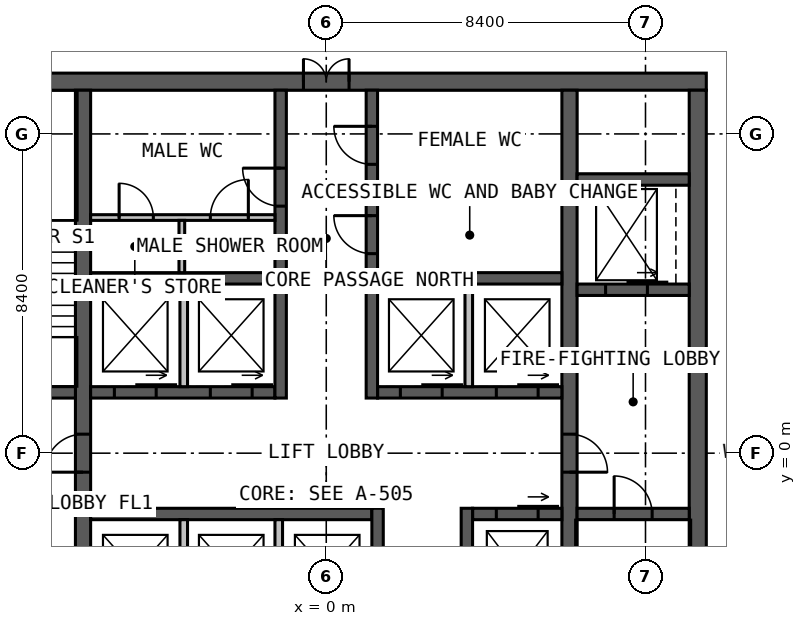
"""IFC4 building model, lengths in metres.
Left out: names, types, materials, properties, quantities, classifications, styles, units other than length and angle.
Written with IfcOpenShell. Run it as: python <this file> out.ifc"""

import sys

from ifc_helpers import new_model, si_unit, direction, frame, frame_2d, origin, place, context, subcontext, project, spatial, rectangle, extrude, element, fill, save


model = new_model("IFC4")
c1 = context("Model", 3, precision=1e-05, world=origin(), true_north=direction((0.0, 1.0)))
c2 = subcontext(c1, "Body", "Model", "MODEL_VIEW")
j1 = project(units=[si_unit("LENGTHUNIT", "METRE"), si_unit("PLANEANGLEUNIT", "RADIAN")], contexts=[c1])
p1 = place(None, origin())
s1 = spatial("IfcSite", under=j1, at=p1, CompositionType="ELEMENT")
p2 = place(p1, origin())
s2 = spatial("IfcBuilding", under=s1, at=p2, CompositionType="ELEMENT")
p3 = place(p2, frame((0.0, 0.0, 183.0)))
s3 = spatial("IfcBuildingStorey", under=s2, at=p3, CompositionType="ELEMENT", Elevation=183.0)
p4 = place(p3, frame((-10.0, 9.775, 0.0), z_axis=(0.0, 0.0, 1.0), x_axis=(1.0, 0.0, 0.0)))
e1 = element("IfcWall", 1, at=p4, inside=s3, PredefinedType="SOLIDWALL", context=c2, shape_type="SweptSolid", body=[
    extrude(rectangle(XDim=20.0, YDim=0.45, at=frame_2d((10.0, 0.0))), origin(), (0.0, 0.0, 1.0), 4.0),
])
p5 = place(p4, frame((9.4, 0.0, 0.0)))
e2 = element("IfcOpeningElement", 2, at=p5, cuts=e1, PredefinedType="OPENING", context=c2, shape_type="SweptSolid", body=[
    extrude(rectangle(XDim=1.2, YDim=2.2, at=frame_2d((0.6, 1.1))), frame((0.0, 0.235, 0.0), z_axis=(0.0, -1.0, 0.0), x_axis=(1.0, 0.0, 0.0)), (0.0, 0.0, 1.0), 0.47),
])
p6 = place(p3, frame((9.775, -9.55, 0.0), z_axis=(0.0, 0.0, 1.0), x_axis=(0.0, 1.0, 0.0)))
e3 = element("IfcWall", 3, at=p6, inside=s3, PredefinedType="SOLIDWALL", context=c2, shape_type="SweptSolid", body=[
    extrude(rectangle(XDim=19.1, YDim=0.45, at=frame_2d((9.55, 0.0))), origin(), (0.0, 0.0, 1.0), 4.0),
])
p7 = place(p3, frame((-6.4, -9.55, 0.0), z_axis=(0.0, 0.0, 1.0), x_axis=(0.0, 1.0, 0.0)))
e4 = element("IfcWall", 4, at=p7, inside=s3, PredefinedType="SOLIDWALL", context=c2, shape_type="SweptSolid", body=[
    extrude(rectangle(XDim=19.1, YDim=0.4, at=frame_2d((9.55, 0.0))), origin(), (0.0, 0.0, 1.0), 4.0),
])
p8 = place(p7, frame((9.05, 0.0, 0.0)))
e5 = element("IfcOpeningElement", 5, at=p8, cuts=e4, PredefinedType="OPENING", context=c2, shape_type="SweptSolid", body=[
    extrude(rectangle(XDim=1.0, YDim=2.2, at=frame_2d((0.5, 1.1))), frame((0.0, 0.21, 0.0), z_axis=(0.0, -1.0, 0.0), x_axis=(1.0, 0.0, 0.0)), (0.0, 0.0, 1.0), 0.42),
])
p9 = place(p3, frame((6.4, 9.55, 0.0), z_axis=(0.0, 0.0, 1.0), x_axis=(0.0, -1.0, 0.0)))
e6 = element("IfcWall", 6, at=p9, inside=s3, PredefinedType="SOLIDWALL", context=c2, shape_type="SweptSolid", body=[
    extrude(rectangle(XDim=19.1, YDim=0.4, at=frame_2d((9.55, 0.0))), origin(), (0.0, 0.0, 1.0), 4.0),
])
p10 = place(p9, frame((9.05, 0.0, 0.0)))
e7 = element("IfcOpeningElement", 7, at=p10, cuts=e6, PredefinedType="OPENING", context=c2, shape_type="SweptSolid", body=[
    extrude(rectangle(XDim=1.0, YDim=2.2, at=frame_2d((0.5, 1.1))), frame((0.0, 0.21, 0.0), z_axis=(0.0, -1.0, 0.0), x_axis=(1.0, 0.0, 0.0)), (0.0, 0.0, 1.0), 0.42),
])
p11 = place(p3, frame((-6.2, 1.6, 0.0), z_axis=(0.0, 0.0, 1.0), x_axis=(1.0, 0.0, 0.0)))
e8 = element("IfcWall", 8, at=p11, inside=s3, PredefinedType="SOLIDWALL", context=c2, shape_type="SweptSolid", body=[
    extrude(rectangle(XDim=4.85, YDim=0.3, at=frame_2d((2.425, 0.0))), origin(), (0.0, 0.0, 1.0), 4.0),
])
p12 = place(p11, frame((0.625, 0.0, 0.0)))
e9 = element("IfcOpeningElement", 9, at=p12, cuts=e8, PredefinedType="OPENING", context=c2, shape_type="SweptSolid", body=[
    extrude(rectangle(XDim=1.1, YDim=2.2, at=frame_2d((0.55, 1.1))), frame((0.0, 0.16, 0.0), z_axis=(0.0, -1.0, 0.0), x_axis=(1.0, 0.0, 0.0)), (0.0, 0.0, 1.0), 0.32),
])
p13 = place(p11, frame((3.15, 0.0, 0.0)))
e10 = element("IfcOpeningElement", 10, at=p13, cuts=e8, PredefinedType="OPENING", context=c2, shape_type="SweptSolid", body=[
    extrude(rectangle(XDim=1.1, YDim=2.2, at=frame_2d((0.55, 1.1))), frame((0.0, 0.16, 0.0), z_axis=(0.0, -1.0, 0.0), x_axis=(1.0, 0.0, 0.0)), (0.0, 0.0, 1.0), 0.32),
])
p14 = place(p3, frame((1.35, 1.6, 0.0), z_axis=(0.0, 0.0, 1.0), x_axis=(1.0, 0.0, 0.0)))
e11 = element("IfcWall", 11, at=p14, inside=s3, PredefinedType="SOLIDWALL", context=c2, shape_type="SweptSolid", body=[
    extrude(rectangle(XDim=4.85, YDim=0.3, at=frame_2d((2.425, 0.0))), origin(), (0.0, 0.0, 1.0), 4.0),
])
p15 = place(p14, frame((0.6, 0.0, 0.0)))
e12 = element("IfcOpeningElement", 12, at=p15, cuts=e11, PredefinedType="OPENING", context=c2, shape_type="SweptSolid", body=[
    extrude(rectangle(XDim=1.1, YDim=2.2, at=frame_2d((0.55, 1.1))), frame((0.0, 0.16, 0.0), z_axis=(0.0, -1.0, 0.0), x_axis=(1.0, 0.0, 0.0)), (0.0, 0.0, 1.0), 0.32),
])
p16 = place(p14, frame((3.125, 0.0, 0.0)))
e13 = element("IfcOpeningElement", 13, at=p16, cuts=e11, PredefinedType="OPENING", context=c2, shape_type="SweptSolid", body=[
    extrude(rectangle(XDim=1.1, YDim=2.2, at=frame_2d((0.55, 1.1))), frame((0.0, 0.16, 0.0), z_axis=(0.0, -1.0, 0.0), x_axis=(1.0, 0.0, 0.0)), (0.0, 0.0, 1.0), 0.32),
])
for number, where, z_axis, x_axis in (
    (14, (-6.2, 4.6, 0.0), (0.0, 0.0, 1.0), (1.0, 0.0, 0.0)),
    (15, (1.35, 4.6, 0.0), (0.0, 0.0, 1.0), (1.0, 0.0, 0.0)),
):
    element("IfcWall", number, at=place(p3, frame(where, z_axis=z_axis, x_axis=x_axis)), inside=s3, PredefinedType="SOLIDWALL", context=c2, shape_type="SweptSolid", body=[
        extrude(rectangle(XDim=4.85, YDim=0.3, at=frame_2d((2.425, 0.0))), origin(), (0.0, 0.0, 1.0), 4.0),
    ])
p17 = place(p3, frame((-1.2, 1.45, 0.0), z_axis=(0.0, 0.0, 1.0), x_axis=(0.0, 1.0, 0.0)))
e16 = element("IfcWall", 16, at=p17, inside=s3, PredefinedType="SOLIDWALL", context=c2, shape_type="SweptSolid", body=[
    extrude(rectangle(XDim=8.1, YDim=0.3, at=frame_2d((4.05, 0.0))), origin(), (0.0, 0.0, 1.0), 4.0),
])
p18 = place(p17, frame((5.05, 0.0, 0.0)))
e17 = element("IfcOpeningElement", 17, at=p18, cuts=e16, PredefinedType="OPENING", context=c2, shape_type="SweptSolid", body=[
    extrude(rectangle(XDim=1.0, YDim=2.2, at=frame_2d((0.5, 1.1))), frame((0.0, 0.16, 0.0), z_axis=(0.0, -1.0, 0.0), x_axis=(1.0, 0.0, 0.0)), (0.0, 0.0, 1.0), 0.32),
])
p19 = place(p3, frame((1.2, 1.45, 0.0), z_axis=(0.0, 0.0, 1.0), x_axis=(0.0, 1.0, 0.0)))
e18 = element("IfcWall", 18, at=p19, inside=s3, PredefinedType="SOLIDWALL", context=c2, shape_type="SweptSolid", body=[
    extrude(rectangle(XDim=8.1, YDim=0.3, at=frame_2d((4.05, 0.0))), origin(), (0.0, 0.0, 1.0), 4.0),
])
p20 = place(p19, frame((3.8, 0.0, 0.0)))
e19 = element("IfcOpeningElement", 19, at=p20, cuts=e18, PredefinedType="OPENING", context=c2, shape_type="SweptSolid", body=[
    extrude(rectangle(XDim=1.0, YDim=2.2, at=frame_2d((0.5, 1.1))), frame((0.0, 0.16, 0.0), z_axis=(0.0, -1.0, 0.0), x_axis=(1.0, 0.0, 0.0)), (0.0, 0.0, 1.0), 0.32),
])
p21 = place(p19, frame((6.15, 0.0, 0.0)))
e20 = element("IfcOpeningElement", 20, at=p21, cuts=e18, PredefinedType="OPENING", context=c2, shape_type="SweptSolid", body=[
    extrude(rectangle(XDim=1.0, YDim=2.2, at=frame_2d((0.5, 1.1))), frame((0.0, 0.16, 0.0), z_axis=(0.0, -1.0, 0.0), x_axis=(1.0, 0.0, 0.0)), (0.0, 0.0, 1.0), 0.32),
])
p22 = place(p3, frame((-6.2, -1.6, 0.0), z_axis=(0.0, 0.0, 1.0), x_axis=(1.0, 0.0, 0.0)))
e21 = element("IfcWall", 21, at=p22, inside=s3, PredefinedType="SOLIDWALL", context=c2, shape_type="SweptSolid", body=[
    extrude(rectangle(XDim=7.4, YDim=0.3, at=frame_2d((3.7, 0.0))), origin(), (0.0, 0.0, 1.0), 4.0),
])
p23 = place(p3, frame((3.85, -1.6, 0.0), z_axis=(0.0, 0.0, 1.0), x_axis=(1.0, 0.0, 0.0)))
e22 = element("IfcWall", 22, at=p23, inside=s3, PredefinedType="SOLIDWALL", context=c2, shape_type="SweptSolid", body=[
    extrude(rectangle(XDim=2.35, YDim=0.3, at=frame_2d((1.175, 0.0))), origin(), (0.0, 0.0, 1.0), 4.0),
])
p24 = place(p23, frame((0.625, 0.0, 0.0)))
e23 = element("IfcOpeningElement", 23, at=p24, cuts=e22, PredefinedType="OPENING", context=c2, shape_type="SweptSolid", body=[
    extrude(rectangle(XDim=1.1, YDim=2.2, at=frame_2d((0.55, 1.1))), frame((0.0, 0.16, 0.0), z_axis=(0.0, -1.0, 0.0), x_axis=(1.0, 0.0, 0.0)), (0.0, 0.0, 1.0), 0.32),
])
p25 = place(p3, frame((1.35, -1.45, 0.0), z_axis=(0.0, 0.0, 1.0), x_axis=(0.0, -1.0, 0.0)))
e24 = element("IfcWall", 24, at=p25, inside=s3, PredefinedType="SOLIDWALL", context=c2, shape_type="SweptSolid", body=[
    extrude(rectangle(XDim=8.1, YDim=0.3, at=frame_2d((4.05, 0.0))), origin(), (0.0, 0.0, 1.0), 4.0),
])
p26 = place(p25, frame((5.975, 0.0, 0.0)))
e25 = element("IfcOpeningElement", 25, at=p26, cuts=e24, PredefinedType="OPENING", context=c2, shape_type="SweptSolid", body=[
    extrude(rectangle(XDim=1.0, YDim=2.2, at=frame_2d((0.5, 1.1))), frame((0.0, 0.16, 0.0), z_axis=(0.0, -1.0, 0.0), x_axis=(1.0, 0.0, 0.0)), (0.0, 0.0, 1.0), 0.32),
])
p27 = place(p25, frame((3.525, 0.0, 0.0)))
e26 = element("IfcOpeningElement", 26, at=p27, cuts=e24, PredefinedType="OPENING", context=c2, shape_type="SweptSolid", body=[
    extrude(rectangle(XDim=0.9, YDim=2.2, at=frame_2d((0.45, 1.1))), frame((0.0, 0.16, 0.0), z_axis=(0.0, -1.0, 0.0), x_axis=(1.0, 0.0, 0.0)), (0.0, 0.0, 1.0), 0.32),
])
p28 = place(p3, frame((3.7, -1.45, 0.0), z_axis=(0.0, 0.0, 1.0), x_axis=(0.0, -1.0, 0.0)))
e27 = element("IfcWall", 27, at=p28, inside=s3, PredefinedType="SOLIDWALL", context=c2, shape_type="SweptSolid", body=[
    extrude(rectangle(XDim=8.1, YDim=0.3, at=frame_2d((4.05, 0.0))), origin(), (0.0, 0.0, 1.0), 4.0),
])
p29 = place(p28, frame((5.1, 0.0, 0.0)))
e28 = element("IfcOpeningElement", 28, at=p29, cuts=e27, PredefinedType="OPENING", context=c2, shape_type="SweptSolid", body=[
    extrude(rectangle(XDim=0.9, YDim=2.2, at=frame_2d((0.45, 1.1))), frame((0.0, 0.16, 0.0), z_axis=(0.0, -1.0, 0.0), x_axis=(1.0, 0.0, 0.0)), (0.0, 0.0, 1.0), 0.32),
])
p30 = place(p3, frame((-9.55, 1.6, 0.0), z_axis=(0.0, 0.0, 1.0), x_axis=(1.0, 0.0, 0.0)))
e29 = element("IfcWall", 29, at=p30, inside=s3, PredefinedType="SOLIDWALL", context=c2, shape_type="SweptSolid", body=[
    extrude(rectangle(XDim=2.95, YDim=0.3, at=frame_2d((1.475, 0.0))), origin(), (0.0, 0.0, 1.0), 4.0),
])
p31 = place(p30, frame((0.975, 0.0, 0.0)))
e30 = element("IfcOpeningElement", 30, at=p31, cuts=e29, PredefinedType="OPENING", context=c2, shape_type="SweptSolid", body=[
    extrude(rectangle(XDim=1.0, YDim=2.2, at=frame_2d((0.5, 1.1))), frame((0.0, 0.16, 0.0), z_axis=(0.0, -1.0, 0.0), x_axis=(1.0, 0.0, 0.0)), (0.0, 0.0, 1.0), 0.32),
])
p32 = place(p3, frame((6.6, -1.6, 0.0), z_axis=(0.0, 0.0, 1.0), x_axis=(1.0, 0.0, 0.0)))
e31 = element("IfcWall", 31, at=p32, inside=s3, PredefinedType="SOLIDWALL", context=c2, shape_type="SweptSolid", body=[
    extrude(rectangle(XDim=2.95, YDim=0.3, at=frame_2d((1.475, 0.0))), origin(), (0.0, 0.0, 1.0), 4.0),
])
p33 = place(p32, frame((0.975, 0.0, 0.0)))
e32 = element("IfcOpeningElement", 32, at=p33, cuts=e31, PredefinedType="OPENING", context=c2, shape_type="SweptSolid", body=[
    extrude(rectangle(XDim=1.0, YDim=2.2, at=frame_2d((0.5, 1.1))), frame((0.0, 0.16, 0.0), z_axis=(0.0, -1.0, 0.0), x_axis=(1.0, 0.0, 0.0)), (0.0, 0.0, 1.0), 0.32),
])
p34 = place(p3, frame((6.6, 4.3, 0.0), z_axis=(0.0, 0.0, 1.0), x_axis=(1.0, 0.0, 0.0)))
e33 = element("IfcWall", 33, at=p34, inside=s3, PredefinedType="SOLIDWALL", context=c2, shape_type="SweptSolid", body=[
    extrude(rectangle(XDim=2.95, YDim=0.3, at=frame_2d((1.475, 0.0))), origin(), (0.0, 0.0, 1.0), 4.0),
])
p35 = place(p34, frame((0.75, 0.0, 0.0)))
e34 = element("IfcOpeningElement", 34, at=p35, cuts=e33, PredefinedType="OPENING", context=c2, shape_type="SweptSolid", body=[
    extrude(rectangle(XDim=1.1, YDim=2.2, at=frame_2d((0.55, 1.1))), frame((0.0, 0.16, 0.0), z_axis=(0.0, -1.0, 0.0), x_axis=(1.0, 0.0, 0.0)), (0.0, 0.0, 1.0), 0.32),
])
p36 = place(p3, frame((6.6, 7.2, 0.0), z_axis=(0.0, 0.0, 1.0), x_axis=(1.0, 0.0, 0.0)))
e35 = element("IfcWall", 35, at=p36, inside=s3, PredefinedType="SOLIDWALL", context=c2, shape_type="SweptSolid", body=[
    extrude(rectangle(XDim=2.95, YDim=0.3, at=frame_2d((1.475, 0.0))), origin(), (0.0, 0.0, 1.0), 4.0),
])
for number, where, z_axis, x_axis in (
    (36, (-3.75, 1.75, 0.0), (0.0, 0.0, 1.0), (0.0, 1.0, 0.0)),
    (37, (3.75, 1.75, 0.0), (0.0, 0.0, 1.0), (0.0, 1.0, 0.0)),
    (38, (-3.75, -1.75, 0.0), (0.0, 0.0, 1.0), (0.0, -1.0, 0.0)),
    (39, (-1.25, -1.75, 0.0), (0.0, 0.0, 1.0), (0.0, -1.0, 0.0)),
):
    element("IfcWall", number, at=place(p3, frame(where, z_axis=z_axis, x_axis=x_axis)), inside=s3, PredefinedType="SOLIDWALL", context=c2, shape_type="SweptSolid", body=[
        extrude(rectangle(XDim=2.7, YDim=0.2, at=frame_2d((1.35, 0.0))), origin(), (0.0, 0.0, 1.0), 3.75),
    ])
p37 = place(p3, frame((1.35, 6.8, 0.0), z_axis=(0.0, 0.0, 1.0), x_axis=(1.0, 0.0, 0.0)))
e40 = element("IfcWall", 40, at=p37, inside=s3, PredefinedType="PARTITIONING", context=c2, shape_type="SweptSolid", body=[
    extrude(rectangle(XDim=4.85, YDim=0.15, at=frame_2d((2.425, 0.0))), origin(), (0.0, 0.0, 1.0), 3.75),
])
p38 = place(p3, frame((-6.2, 6.2, 0.0), z_axis=(0.0, 0.0, 1.0), x_axis=(1.0, 0.0, 0.0)))
e41 = element("IfcWall", 41, at=p38, inside=s3, PredefinedType="PARTITIONING", context=c2, shape_type="SweptSolid", body=[
    extrude(rectangle(XDim=4.85, YDim=0.15, at=frame_2d((2.425, 0.0))), origin(), (0.0, 0.0, 1.0), 3.75),
])
p39 = place(p38, frame((3.15, 0.0, 0.0)))
e42 = element("IfcOpeningElement", 42, at=p39, cuts=e41, PredefinedType="OPENING", context=c2, shape_type="SweptSolid", body=[
    extrude(rectangle(XDim=1.0, YDim=2.2, at=frame_2d((0.5, 1.1))), frame((0.0, 0.085, 0.0), z_axis=(0.0, -1.0, 0.0), x_axis=(1.0, 0.0, 0.0)), (0.0, 0.0, 1.0), 0.17),
])
p40 = place(p38, frame((0.75, 0.0, 0.0)))
e43 = element("IfcOpeningElement", 43, at=p40, cuts=e41, PredefinedType="OPENING", context=c2, shape_type="SweptSolid", body=[
    extrude(rectangle(XDim=0.9, YDim=2.2, at=frame_2d((0.45, 1.1))), frame((0.0, 0.085, 0.0), z_axis=(0.0, -1.0, 0.0), x_axis=(1.0, 0.0, 0.0)), (0.0, 0.0, 1.0), 0.17),
])
p41 = place(p3, frame((-3.8, 4.75, 0.0), z_axis=(0.0, 0.0, 1.0), x_axis=(0.0, 1.0, 0.0)))
e44 = element("IfcWall", 44, at=p41, inside=s3, PredefinedType="PARTITIONING", context=c2, shape_type="SweptSolid", body=[
    extrude(rectangle(XDim=1.375, YDim=0.15, at=frame_2d((0.688, 0.0))), origin(), (0.0, 0.0, 1.0), 3.75),
])
p42 = place(p5, origin())
e45 = element("IfcDoor", 45, at=p42, inside=s3, OperationType="DOUBLE_DOOR_SINGLE_SWING", PredefinedType="DOOR", context=c2, shape_type="SweptSolid", body=[
    extrude(rectangle(XDim=1.2, YDim=2.2, at=frame_2d((0.6, 1.1))), frame((0.0, 0.025, 0.0), z_axis=(0.0, -1.0, 0.0), x_axis=(1.0, 0.0, 0.0)), (0.0, 0.0, 1.0), 0.05),
])
fill(e2, e45)
p43 = place(p8, origin())
e46 = element("IfcDoor", 46, at=p43, inside=s3, OperationType="SINGLE_SWING_LEFT", PredefinedType="DOOR", context=c2, shape_type="SweptSolid", body=[
    extrude(rectangle(XDim=1.0, YDim=2.2, at=frame_2d((0.5, 1.1))), frame((0.0, 0.025, 0.0), z_axis=(0.0, -1.0, 0.0), x_axis=(1.0, 0.0, 0.0)), (0.0, 0.0, 1.0), 0.05),
])
fill(e5, e46)
p44 = place(p10, origin())
e47 = element("IfcDoor", 47, at=p44, inside=s3, OperationType="SINGLE_SWING_RIGHT", PredefinedType="DOOR", context=c2, shape_type="SweptSolid", body=[
    extrude(rectangle(XDim=1.0, YDim=2.2, at=frame_2d((0.5, 1.1))), frame((0.0, 0.025, 0.0), z_axis=(0.0, -1.0, 0.0), x_axis=(1.0, 0.0, 0.0)), (0.0, 0.0, 1.0), 0.05),
])
fill(e7, e47)
p45 = place(p33, origin())
e48 = element("IfcDoor", 48, at=p45, inside=s3, OperationType="SINGLE_SWING_LEFT", PredefinedType="DOOR", context=c2, shape_type="SweptSolid", body=[
    extrude(rectangle(XDim=1.0, YDim=2.2, at=frame_2d((0.5, 1.1))), frame((0.0, 0.025, 0.0), z_axis=(0.0, -1.0, 0.0), x_axis=(1.0, 0.0, 0.0)), (0.0, 0.0, 1.0), 0.05),
])
fill(e32, e48)
p46 = place(p18, origin())
e49 = element("IfcDoor", 49, at=p46, inside=s3, OperationType="SINGLE_SWING_RIGHT", PredefinedType="DOOR", context=c2, shape_type="SweptSolid", body=[
    extrude(rectangle(XDim=1.0, YDim=2.2, at=frame_2d((0.5, 1.1))), frame((0.0, 0.025, 0.0), z_axis=(0.0, -1.0, 0.0), x_axis=(1.0, 0.0, 0.0)), (0.0, 0.0, 1.0), 0.05),
])
fill(e17, e49)
p47 = place(p20, origin())
e50 = element("IfcDoor", 50, at=p47, inside=s3, OperationType="SINGLE_SWING_RIGHT", PredefinedType="DOOR", context=c2, shape_type="SweptSolid", body=[
    extrude(rectangle(XDim=1.0, YDim=2.2, at=frame_2d((0.5, 1.1))), frame((0.0, 0.025, 0.0), z_axis=(0.0, -1.0, 0.0), x_axis=(1.0, 0.0, 0.0)), (0.0, 0.0, 1.0), 0.05),
])
fill(e19, e50)
p48 = place(p21, origin())
e51 = element("IfcDoor", 51, at=p48, inside=s3, OperationType="SINGLE_SWING_RIGHT", PredefinedType="DOOR", context=c2, shape_type="SweptSolid", body=[
    extrude(rectangle(XDim=1.0, YDim=2.2, at=frame_2d((0.5, 1.1))), frame((0.0, 0.025, 0.0), z_axis=(0.0, -1.0, 0.0), x_axis=(1.0, 0.0, 0.0)), (0.0, 0.0, 1.0), 0.05),
])
fill(e20, e51)
p49 = place(p39, origin())
e52 = element("IfcDoor", 52, at=p49, inside=s3, OperationType="SINGLE_SWING_RIGHT", PredefinedType="DOOR", context=c2, shape_type="SweptSolid", body=[
    extrude(rectangle(XDim=1.0, YDim=2.2, at=frame_2d((0.5, 1.1))), frame((0.0, 0.025, 0.0), z_axis=(0.0, -1.0, 0.0), x_axis=(1.0, 0.0, 0.0)), (0.0, 0.0, 1.0), 0.05),
])
fill(e42, e52)
p50 = place(p40, origin())
e53 = element("IfcDoor", 53, at=p50, inside=s3, OperationType="SINGLE_SWING_LEFT", PredefinedType="DOOR", context=c2, shape_type="SweptSolid", body=[
    extrude(rectangle(XDim=0.9, YDim=2.2, at=frame_2d((0.45, 1.1))), frame((0.0, 0.025, 0.0), z_axis=(0.0, -1.0, 0.0), x_axis=(1.0, 0.0, 0.0)), (0.0, 0.0, 1.0), 0.05),
])
fill(e43, e53)
p51 = place(p12, origin())
e54 = element("IfcDoor", 54, at=p51, inside=s3, OperationType="SLIDING_TO_LEFT", PredefinedType="DOOR", context=c2, shape_type="SweptSolid", body=[
    extrude(rectangle(XDim=1.1, YDim=2.2, at=frame_2d((0.55, 1.1))), frame((0.0, 0.025, 0.0), z_axis=(0.0, -1.0, 0.0), x_axis=(1.0, 0.0, 0.0)), (0.0, 0.0, 1.0), 0.05),
])
fill(e9, e54)
p52 = place(p13, origin())
e55 = element("IfcDoor", 55, at=p52, inside=s3, OperationType="SLIDING_TO_LEFT", PredefinedType="DOOR", context=c2, shape_type="SweptSolid", body=[
    extrude(rectangle(XDim=1.1, YDim=2.2, at=frame_2d((0.55, 1.1))), frame((0.0, 0.025, 0.0), z_axis=(0.0, -1.0, 0.0), x_axis=(1.0, 0.0, 0.0)), (0.0, 0.0, 1.0), 0.05),
])
fill(e10, e55)
p53 = place(p15, origin())
e56 = element("IfcDoor", 56, at=p53, inside=s3, OperationType="SLIDING_TO_LEFT", PredefinedType="DOOR", context=c2, shape_type="SweptSolid", body=[
    extrude(rectangle(XDim=1.1, YDim=2.2, at=frame_2d((0.55, 1.1))), frame((0.0, 0.025, 0.0), z_axis=(0.0, -1.0, 0.0), x_axis=(1.0, 0.0, 0.0)), (0.0, 0.0, 1.0), 0.05),
])
fill(e12, e56)
p54 = place(p16, origin())
e57 = element("IfcDoor", 57, at=p54, inside=s3, OperationType="SLIDING_TO_LEFT", PredefinedType="DOOR", context=c2, shape_type="SweptSolid", body=[
    extrude(rectangle(XDim=1.1, YDim=2.2, at=frame_2d((0.55, 1.1))), frame((0.0, 0.025, 0.0), z_axis=(0.0, -1.0, 0.0), x_axis=(1.0, 0.0, 0.0)), (0.0, 0.0, 1.0), 0.05),
])
fill(e13, e57)
p55 = place(p24, origin())
e58 = element("IfcDoor", 58, at=p55, inside=s3, OperationType="SLIDING_TO_LEFT", PredefinedType="DOOR", context=c2, shape_type="SweptSolid", body=[
    extrude(rectangle(XDim=1.1, YDim=2.2, at=frame_2d((0.55, 1.1))), frame((0.0, 0.025, 0.0), z_axis=(0.0, -1.0, 0.0), x_axis=(1.0, 0.0, 0.0)), (0.0, 0.0, 1.0), 0.05),
])
fill(e23, e58)
p56 = place(p35, origin())
e59 = element("IfcDoor", 59, at=p56, inside=s3, OperationType="SLIDING_TO_LEFT", PredefinedType="DOOR", context=c2, shape_type="SweptSolid", body=[
    extrude(rectangle(XDim=1.1, YDim=2.2, at=frame_2d((0.55, 1.1))), frame((0.0, 0.025, 0.0), z_axis=(0.0, -1.0, 0.0), x_axis=(1.0, 0.0, 0.0)), (0.0, 0.0, 1.0), 0.05),
])
fill(e34, e59)
save(model, sys.argv[1])
